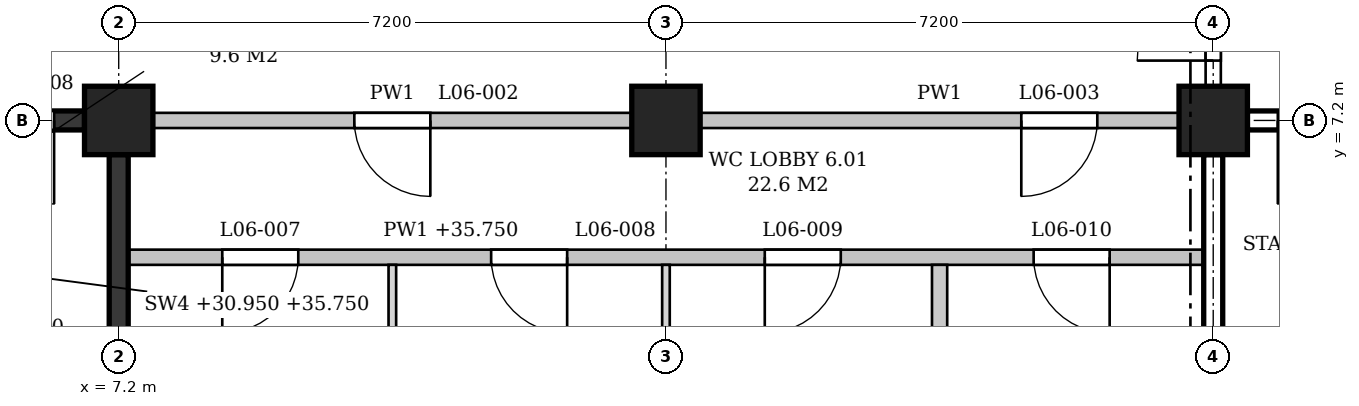
"""IFC4 building model, lengths in metres.
Left out: names, types, materials, properties, quantities, classifications, styles, units other than length and angle.
Written with IfcOpenShell. Run it as: python <this file> out.ifc"""

import sys

from ifc_helpers import new_model, si_unit, direction, frame, frame_2d, origin, origin_2d, place, context, subcontext, project, spatial, polyline, rectangle, outline, extrude, element, fill, save


model = new_model("IFC4")
c1 = context("Model", 3, precision=1e-05, world=origin(), true_north=direction((0.0, 1.0)))
c2 = subcontext(c1, "Body", "Model", "MODEL_VIEW")
j1 = project(units=[si_unit("LENGTHUNIT", "METRE"), si_unit("PLANEANGLEUNIT", "RADIAN")], contexts=[c1])
p1 = place(None, origin())
s1 = spatial("IfcSite", under=j1, at=p1, CompositionType="ELEMENT")
p2 = place(p1, origin())
s2 = spatial("IfcBuilding", under=s1, at=p2, CompositionType="ELEMENT")
p3 = place(p2, frame((0.0, 0.0, 31.2)))
s3 = spatial("IfcBuildingStorey", under=s2, at=p3, CompositionType="ELEMENT", Elevation=31.2)
for number, where, z_axis, x_axis in (
    (1, (7.2, 7.2, 0.0), (0.0, 0.0, 1.0), (1.0, 0.0, 0.0)),
    (2, (14.4, 7.2, 0.0), (0.0, 0.0, 1.0), (1.0, 0.0, 0.0)),
    (3, (21.6, 7.2, 0.0), (0.0, 0.0, 1.0), (1.0, 0.0, 0.0)),
):
    element("IfcColumn", number, at=place(p3, frame(where, z_axis=z_axis, x_axis=x_axis)), inside=s3, PredefinedType="COLUMN", context=c2, shape_type="SweptSolid", body=[
        extrude(rectangle(XDim=0.9, YDim=0.9, at=origin_2d()), origin(), (0.0, 0.0, 1.0), 4.8),
    ])
p4 = place(p3, frame((0.45, 7.2, 0.0), z_axis=(0.0, 0.0, 1.0), x_axis=(1.0, 0.0, 0.0)))
e4 = element("IfcWall", 4, at=p4, inside=s3, PredefinedType="SHEAR", context=c2, shape_type="SweptSolid", body=[
    extrude(rectangle(XDim=6.3, YDim=0.25, at=frame_2d((3.15, 0.0))), origin(), (0.0, 0.0, 1.0), 3.8),
])
p5 = place(p4, frame((4.8, 0.0, 0.0)))
e5 = element("IfcOpeningElement", 5, at=p5, cuts=e4, PredefinedType="OPENING", context=c2, shape_type="SweptSolid", body=[
    extrude(rectangle(XDim=1.1, YDim=2.1, at=frame_2d((0.55, 1.05))), frame((0.0, 0.135, 0.0), z_axis=(0.0, -1.0, 0.0), x_axis=(1.0, 0.0, 0.0)), (0.0, 0.0, 1.0), 0.27),
])
p6 = place(p3, frame((7.2, 0.45, 0.0), z_axis=(0.0, 0.0, 1.0), x_axis=(0.0, 1.0, 0.0)))
e6 = element("IfcWall", 6, at=p6, inside=s3, PredefinedType="SHEAR", context=c2, shape_type="SweptSolid", body=[
    extrude(rectangle(XDim=6.3, YDim=0.25, at=frame_2d((3.15, 0.0))), origin(), (0.0, 0.0, 1.0), 3.8),
])
p7 = place(p3, frame((22.05, 7.2, 0.0), z_axis=(0.0, 0.0, 1.0), x_axis=(1.0, 0.0, 0.0)))
e7 = element("IfcWall", 7, at=p7, inside=s3, PredefinedType="SHEAR", context=c2, shape_type="SweptSolid", body=[
    extrude(rectangle(XDim=6.3, YDim=0.25, at=frame_2d((3.15, 0.0))), origin(), (0.0, 0.0, 1.0), 3.8),
])
p8 = place(p7, frame((0.4, 0.0, 0.0)))
e8 = element("IfcOpeningElement", 8, at=p8, cuts=e7, PredefinedType="OPENING", context=c2, shape_type="SweptSolid", body=[
    extrude(rectangle(XDim=1.1, YDim=2.1, at=frame_2d((0.55, 1.05))), frame((0.0, 0.135, 0.0), z_axis=(0.0, -1.0, 0.0), x_axis=(1.0, 0.0, 0.0)), (0.0, 0.0, 1.0), 0.27),
])
p9 = place(p3, frame((21.6, 0.45, 0.0), z_axis=(0.0, 0.0, 1.0), x_axis=(0.0, 1.0, 0.0)))
e9 = element("IfcWall", 9, at=p9, inside=s3, PredefinedType="SHEAR", context=c2, shape_type="SweptSolid", body=[
    extrude(rectangle(XDim=6.3, YDim=0.25, at=frame_2d((3.15, 0.0))), origin(), (0.0, 0.0, 1.0), 3.8),
])
p10 = place(p3, frame((7.325, 5.4, 0.0), z_axis=(0.0, 0.0, 1.0), x_axis=(1.0, 0.0, 0.0)))
e10 = element("IfcWall", 10, at=p10, inside=s3, PredefinedType="PARTITIONING", context=c2, shape_type="SweptSolid", body=[
    extrude(outline(polyline([(0.0, 0.0), (14.15, 0.0), (14.15, 3.8), (14.025, 3.8), (14.025, 4.55), (7.325, 4.55), (7.325, 3.8), (6.825, 3.8), (6.825, 4.55), (0.125, 4.55), (0.125, 3.8), (0.0, 3.8), (0.0, 0.0)])), frame((0.0, 0.1, 0.0), z_axis=(0.0, -1.0, 0.0), x_axis=(1.0, 0.0, 0.0)), (0.0, 0.0, 1.0), 0.2),
])
p11 = place(p10, frame((1.238, 0.0, 0.0)))
e11 = element("IfcOpeningElement", 11, at=p11, cuts=e10, PredefinedType="OPENING", context=c2, shape_type="SweptSolid", body=[
    extrude(rectangle(XDim=1.0, YDim=2.1, at=frame_2d((0.5, 1.05))), frame((0.0, 0.11, 0.0), z_axis=(0.0, -1.0, 0.0), x_axis=(1.0, 0.0, 0.0)), (0.0, 0.0, 1.0), 0.22),
])
p12 = place(p10, frame((4.775, 0.0, 0.0)))
e12 = element("IfcOpeningElement", 12, at=p12, cuts=e10, PredefinedType="OPENING", context=c2, shape_type="SweptSolid", body=[
    extrude(rectangle(XDim=1.0, YDim=2.1, at=frame_2d((0.5, 1.05))), frame((0.0, 0.11, 0.0), z_axis=(0.0, -1.0, 0.0), x_axis=(1.0, 0.0, 0.0)), (0.0, 0.0, 1.0), 0.22),
])
p13 = place(p10, frame((8.375, 0.0, 0.0)))
e13 = element("IfcOpeningElement", 13, at=p13, cuts=e10, PredefinedType="OPENING", context=c2, shape_type="SweptSolid", body=[
    extrude(rectangle(XDim=1.0, YDim=2.1, at=frame_2d((0.5, 1.05))), frame((0.0, 0.11, 0.0), z_axis=(0.0, -1.0, 0.0), x_axis=(1.0, 0.0, 0.0)), (0.0, 0.0, 1.0), 0.22),
])
p14 = place(p10, frame((11.913, 0.0, 0.0)))
e14 = element("IfcOpeningElement", 14, at=p14, cuts=e10, PredefinedType="OPENING", context=c2, shape_type="SweptSolid", body=[
    extrude(rectangle(XDim=1.0, YDim=2.1, at=frame_2d((0.5, 1.05))), frame((0.0, 0.11, 0.0), z_axis=(0.0, -1.0, 0.0), x_axis=(1.0, 0.0, 0.0)), (0.0, 0.0, 1.0), 0.22),
])
p15 = place(p3, frame((7.65, 7.2, 0.0), z_axis=(0.0, 0.0, 1.0), x_axis=(1.0, 0.0, 0.0)))
e15 = element("IfcWall", 15, at=p15, inside=s3, PredefinedType="PARTITIONING", context=c2, shape_type="SweptSolid", body=[
    extrude(rectangle(XDim=6.3, YDim=0.2, at=frame_2d((3.15, 0.0))), origin(), (0.0, 0.0, 1.0), 3.8),
])
p16 = place(p15, frame((2.65, 0.0, 0.0)))
e16 = element("IfcOpeningElement", 16, at=p16, cuts=e15, PredefinedType="OPENING", context=c2, shape_type="SweptSolid", body=[
    extrude(rectangle(XDim=1.0, YDim=2.1, at=frame_2d((0.5, 1.05))), frame((0.0, 0.11, 0.0), z_axis=(0.0, -1.0, 0.0), x_axis=(1.0, 0.0, 0.0)), (0.0, 0.0, 1.0), 0.22),
])
p17 = place(p3, frame((14.85, 7.2, 0.0), z_axis=(0.0, 0.0, 1.0), x_axis=(1.0, 0.0, 0.0)))
e17 = element("IfcWall", 17, at=p17, inside=s3, PredefinedType="PARTITIONING", context=c2, shape_type="SweptSolid", body=[
    extrude(rectangle(XDim=6.3, YDim=0.2, at=frame_2d((3.15, 0.0))), origin(), (0.0, 0.0, 1.0), 3.8),
])
p18 = place(p17, frame((4.225, 0.0, 0.0)))
e18 = element("IfcOpeningElement", 18, at=p18, cuts=e17, PredefinedType="OPENING", context=c2, shape_type="SweptSolid", body=[
    extrude(rectangle(XDim=1.0, YDim=2.1, at=frame_2d((0.5, 1.05))), frame((0.0, 0.11, 0.0), z_axis=(0.0, -1.0, 0.0), x_axis=(1.0, 0.0, 0.0)), (0.0, 0.0, 1.0), 0.22),
])
p19 = place(p3, frame((10.8, 0.15, 0.0), z_axis=(0.0, 0.0, 1.0), x_axis=(0.0, 1.0, 0.0)))
e19 = element("IfcWall", 19, at=p19, inside=s3, PredefinedType="PARTITIONING", context=c2, shape_type="SweptSolid", body=[
    extrude(rectangle(XDim=5.15, YDim=0.1, at=frame_2d((2.575, 0.0))), origin(), (0.0, 0.0, 1.0), 3.8),
])
p20 = place(p3, frame((14.4, 0.45, 0.0), z_axis=(0.0, 0.0, 1.0), x_axis=(0.0, 1.0, 0.0)))
e20 = element("IfcWall", 20, at=p20, inside=s3, PredefinedType="PARTITIONING", context=c2, shape_type="SweptSolid", body=[
    extrude(rectangle(XDim=4.85, YDim=0.1, at=frame_2d((2.425, 0.0))), origin(), (0.0, 0.0, 1.0), 3.8),
])
p21 = place(p3, frame((18.0, 0.15, 0.0), z_axis=(0.0, 0.0, 1.0), x_axis=(0.0, 1.0, 0.0)))
e21 = element("IfcWall", 21, at=p21, inside=s3, PredefinedType="PARTITIONING", context=c2, shape_type="SweptSolid", body=[
    extrude(outline(polyline([(0.0, 0.0), (5.15, 0.0), (5.15, 4.55), (0.1, 4.55), (0.1, 3.95), (0.0, 3.95), (0.0, 0.0)])), frame((0.0, 0.1, 0.0), z_axis=(0.0, -1.0, 0.0), x_axis=(1.0, 0.0, 0.0)), (0.0, 0.0, 1.0), 0.2),
])
p22 = place(p3, frame((21.6, 7.65, 0.0), z_axis=(0.0, 0.0, 1.0), x_axis=(0.0, 1.0, 0.0)))
e22 = element("IfcWall", 22, at=p22, inside=s3, PredefinedType="PARTITIONING", context=c2, shape_type="SweptSolid", body=[
    extrude(rectangle(XDim=2.675, YDim=0.2, at=frame_2d((1.337, 0.0))), origin(), (0.0, 0.0, 1.0), 3.8),
])
p23 = place(p22, frame((0.337, 0.0, 0.0)))
e23 = element("IfcOpeningElement", 23, at=p23, cuts=e22, PredefinedType="OPENING", context=c2, shape_type="SweptSolid", body=[
    extrude(rectangle(XDim=2.0, YDim=2.4, at=frame_2d((1.0, 1.2))), frame((0.0, 0.11, 0.0), z_axis=(0.0, -1.0, 0.0), x_axis=(1.0, 0.0, 0.0)), (0.0, 0.0, 1.0), 0.22),
])
p24 = place(p5, frame((1.1, 0.0, 0.0), z_axis=(0.0, 0.0, 1.0), x_axis=(-1.0, 0.0, 0.0)))
e24 = element("IfcDoor", 24, at=p24, inside=s3, OperationType="SINGLE_SWING_LEFT", PredefinedType="DOOR", context=c2, shape_type="SweptSolid", body=[
    extrude(rectangle(XDim=1.1, YDim=2.1, at=frame_2d((0.55, 1.05))), frame((0.0, 0.025, 0.0), z_axis=(0.0, -1.0, 0.0), x_axis=(1.0, 0.0, 0.0)), (0.0, 0.0, 1.0), 0.05),
])
fill(e5, e24)
p25 = place(p8, frame((1.1, 0.0, 0.0), z_axis=(0.0, 0.0, 1.0), x_axis=(-1.0, 0.0, 0.0)))
e25 = element("IfcDoor", 25, at=p25, inside=s3, OperationType="SINGLE_SWING_RIGHT", PredefinedType="DOOR", context=c2, shape_type="SweptSolid", body=[
    extrude(rectangle(XDim=1.1, YDim=2.1, at=frame_2d((0.55, 1.05))), frame((0.0, 0.025, 0.0), z_axis=(0.0, -1.0, 0.0), x_axis=(1.0, 0.0, 0.0)), (0.0, 0.0, 1.0), 0.05),
])
fill(e8, e25)
p26 = place(p23, origin())
e26 = element("IfcDoor", 26, at=p26, inside=s3, OperationType="DOUBLE_DOOR_SINGLE_SWING", PredefinedType="DOOR", context=c2, shape_type="SweptSolid", body=[
    extrude(rectangle(XDim=2.0, YDim=2.4, at=frame_2d((1.0, 1.2))), frame((0.0, 0.025, 0.0), z_axis=(0.0, -1.0, 0.0), x_axis=(1.0, 0.0, 0.0)), (0.0, 0.0, 1.0), 0.05),
])
fill(e23, e26)
p27 = place(p16, frame((1.0, 0.0, 0.0), z_axis=(0.0, 0.0, 1.0), x_axis=(-1.0, 0.0, 0.0)))
e27 = element("IfcDoor", 27, at=p27, inside=s3, OperationType="SINGLE_SWING_LEFT", PredefinedType="DOOR", context=c2, shape_type="SweptSolid", body=[
    extrude(rectangle(XDim=1.0, YDim=2.1, at=frame_2d((0.5, 1.05))), frame((0.0, 0.025, 0.0), z_axis=(0.0, -1.0, 0.0), x_axis=(1.0, 0.0, 0.0)), (0.0, 0.0, 1.0), 0.05),
])
fill(e16, e27)
p28 = place(p18, frame((1.0, 0.0, 0.0), z_axis=(0.0, 0.0, 1.0), x_axis=(-1.0, 0.0, 0.0)))
e28 = element("IfcDoor", 28, at=p28, inside=s3, OperationType="SINGLE_SWING_RIGHT", PredefinedType="DOOR", context=c2, shape_type="SweptSolid", body=[
    extrude(rectangle(XDim=1.0, YDim=2.1, at=frame_2d((0.5, 1.05))), frame((0.0, 0.025, 0.0), z_axis=(0.0, -1.0, 0.0), x_axis=(1.0, 0.0, 0.0)), (0.0, 0.0, 1.0), 0.05),
])
fill(e18, e28)
p29 = place(p11, frame((1.0, 0.0, 0.0), z_axis=(0.0, 0.0, 1.0), x_axis=(-1.0, 0.0, 0.0)))
e29 = element("IfcDoor", 29, at=p29, inside=s3, OperationType="SINGLE_SWING_RIGHT", PredefinedType="DOOR", context=c2, shape_type="SweptSolid", body=[
    extrude(rectangle(XDim=1.0, YDim=2.1, at=frame_2d((0.5, 1.05))), frame((0.0, 0.025, 0.0), z_axis=(0.0, -1.0, 0.0), x_axis=(1.0, 0.0, 0.0)), (0.0, 0.0, 1.0), 0.05),
])
fill(e11, e29)
p30 = place(p12, frame((1.0, 0.0, 0.0), z_axis=(0.0, 0.0, 1.0), x_axis=(-1.0, 0.0, 0.0)))
e30 = element("IfcDoor", 30, at=p30, inside=s3, OperationType="SINGLE_SWING_LEFT", PredefinedType="DOOR", context=c2, shape_type="SweptSolid", body=[
    extrude(rectangle(XDim=1.0, YDim=2.1, at=frame_2d((0.5, 1.05))), frame((0.0, 0.025, 0.0), z_axis=(0.0, -1.0, 0.0), x_axis=(1.0, 0.0, 0.0)), (0.0, 0.0, 1.0), 0.05),
])
fill(e12, e30)
p31 = place(p13, frame((1.0, 0.0, 0.0), z_axis=(0.0, 0.0, 1.0), x_axis=(-1.0, 0.0, 0.0)))
e31 = element("IfcDoor", 31, at=p31, inside=s3, OperationType="SINGLE_SWING_RIGHT", PredefinedType="DOOR", context=c2, shape_type="SweptSolid", body=[
    extrude(rectangle(XDim=1.0, YDim=2.1, at=frame_2d((0.5, 1.05))), frame((0.0, 0.025, 0.0), z_axis=(0.0, -1.0, 0.0), x_axis=(1.0, 0.0, 0.0)), (0.0, 0.0, 1.0), 0.05),
])
fill(e13, e31)
p32 = place(p14, frame((1.0, 0.0, 0.0), z_axis=(0.0, 0.0, 1.0), x_axis=(-1.0, 0.0, 0.0)))
e32 = element("IfcDoor", 32, at=p32, inside=s3, OperationType="SINGLE_SWING_LEFT", PredefinedType="DOOR", context=c2, shape_type="SweptSolid", body=[
    extrude(rectangle(XDim=1.0, YDim=2.1, at=frame_2d((0.5, 1.05))), frame((0.0, 0.025, 0.0), z_axis=(0.0, -1.0, 0.0), x_axis=(1.0, 0.0, 0.0)), (0.0, 0.0, 1.0), 0.05),
])
fill(e14, e32)
save(model, sys.argv[1])
